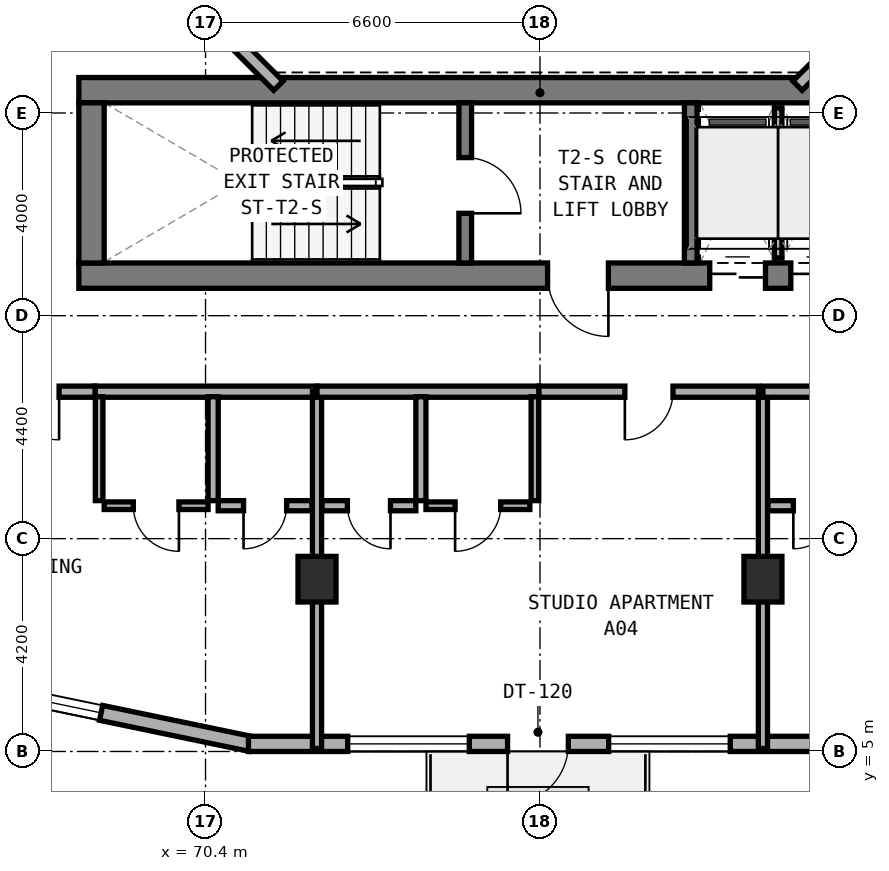
"""IFC4 building model, lengths in metres.
Left out: names, types, materials, properties, quantities, classifications, styles, units other than length and angle.
Written with IfcOpenShell. Run it as: python <this file> out.ifc"""

import sys

from ifc_helpers import new_model, si_unit, direction, frame, frame_2d, origin, origin_2d, place, context, subcontext, project, spatial, rectangle, extrude, element, fill, save


model = new_model("IFC4")
c1 = context("Model", 3, precision=1e-05, world=origin(), true_north=direction((0.0, 1.0)))
c2 = subcontext(c1, "Body", "Model", "MODEL_VIEW")
j1 = project(units=[si_unit("LENGTHUNIT", "METRE"), si_unit("PLANEANGLEUNIT", "RADIAN")], contexts=[c1])
p1 = place(None, origin())
s1 = spatial("IfcSite", under=j1, at=p1, CompositionType="ELEMENT")
p2 = place(p1, origin())
s2 = spatial("IfcBuilding", under=s1, at=p2, CompositionType="ELEMENT")
p3 = place(p2, frame((0.0, 0.0, 59.0)))
s3 = spatial("IfcBuildingStorey", under=s2, at=p3, CompositionType="ELEMENT", Elevation=59.0)
p4 = place(p3, frame((67.9, 14.39, 0.0), z_axis=(0.0, 0.0, 1.0), x_axis=(1.0, 0.0, 0.0)))
e1 = element("IfcWall", 1, at=p4, inside=s3, PredefinedType="SHEAR", context=c2, shape_type="SweptSolid", body=[
    extrude(rectangle(XDim=18.4, YDim=0.5, at=frame_2d((9.2, 0.0))), origin(), (0.0, 0.0, 1.0), 3.5),
])
p5 = place(p4, frame((9.25, 0.0, 0.0)))
e2 = element("IfcOpeningElement", 2, at=p5, cuts=e1, PredefinedType="OPENING", context=c2, shape_type="SweptSolid", body=[
    extrude(rectangle(XDim=1.2, YDim=2.15, at=frame_2d((0.6, 1.075))), frame((0.0, 0.26, 0.0), z_axis=(0.0, -1.0, 0.0), x_axis=(1.0, 0.0, 0.0)), (0.0, 0.0, 1.0), 0.52),
])
p6 = place(p4, frame((16.85, 0.0, 0.0)))
e3 = element("IfcOpeningElement", 3, at=p6, cuts=e1, PredefinedType="OPENING", context=c2, shape_type="SweptSolid", body=[
    extrude(rectangle(XDim=0.85, YDim=2.1, at=frame_2d((0.425, 1.05))), frame((0.0, 0.26, 0.0), z_axis=(0.0, -1.0, 0.0), x_axis=(1.0, 0.0, 0.0)), (0.0, 0.0, 1.0), 0.52),
])
p7 = place(p4, frame((12.45, 0.0, 0.0)))
e4 = element("IfcOpeningElement", 4, at=p7, cuts=e1, PredefinedType="OPENING", context=c2, shape_type="SweptSolid", body=[
    extrude(rectangle(XDim=1.1, YDim=2.15, at=frame_2d((0.55, 1.075))), frame((0.0, 0.26, 0.0), z_axis=(0.0, -1.0, 0.0), x_axis=(1.0, 0.0, 0.0)), (0.0, 0.0, 1.0), 0.52),
])
p8 = place(p4, frame((14.05, 0.0, 0.0)))
e5 = element("IfcOpeningElement", 5, at=p8, cuts=e1, PredefinedType="OPENING", context=c2, shape_type="SweptSolid", body=[
    extrude(rectangle(XDim=1.1, YDim=2.15, at=frame_2d((0.55, 1.075))), frame((0.0, 0.26, 0.0), z_axis=(0.0, -1.0, 0.0), x_axis=(1.0, 0.0, 0.0)), (0.0, 0.0, 1.0), 0.52),
])
p9 = place(p3, frame((67.9, 18.05, 0.0), z_axis=(0.0, 0.0, 1.0), x_axis=(1.0, 0.0, 0.0)))
e6 = element("IfcWall", 6, at=p9, inside=s3, PredefinedType="SHEAR", context=c2, shape_type="SweptSolid", body=[
    extrude(rectangle(XDim=18.4, YDim=0.5, at=frame_2d((9.2, 0.0))), origin(), (0.0, 0.0, 1.0), 3.5),
])
p10 = place(p3, frame((68.15, 14.64, 0.0), z_axis=(0.0, 0.0, 1.0), x_axis=(0.0, 1.0, 0.0)))
e7 = element("IfcWall", 7, at=p10, inside=s3, PredefinedType="SHEAR", context=c2, shape_type="SweptSolid", body=[
    extrude(rectangle(XDim=3.16, YDim=0.5, at=frame_2d((1.58, 0.0))), origin(), (0.0, 0.0, 1.0), 3.5),
])
p11 = place(p3, frame((75.525, 14.64, 0.0), z_axis=(0.0, 0.0, 1.0), x_axis=(0.0, 1.0, 0.0)))
e8 = element("IfcWall", 8, at=p11, inside=s3, PredefinedType="STANDARD", context=c2, shape_type="SweptSolid", body=[
    extrude(rectangle(XDim=3.16, YDim=0.25, at=frame_2d((1.58, 0.0))), origin(), (0.0, 0.0, 1.0), 3.25),
])
p12 = place(p11, frame((0.98, 0.0, 0.0)))
e9 = element("IfcOpeningElement", 9, at=p12, cuts=e8, PredefinedType="OPENING", context=c2, shape_type="SweptSolid", body=[
    extrude(rectangle(XDim=1.1, YDim=2.15, at=frame_2d((0.55, 1.075))), frame((0.0, 0.135, 0.0), z_axis=(0.0, -1.0, 0.0), x_axis=(1.0, 0.0, 0.0)), (0.0, 0.0, 1.0), 0.27),
])
p13 = place(p3, frame((79.975, 14.64, 0.0), z_axis=(0.0, 0.0, 1.0), x_axis=(0.0, 1.0, 0.0)))
e10 = element("IfcWall", 10, at=p13, inside=s3, PredefinedType="STANDARD", context=c2, shape_type="SweptSolid", body=[
    extrude(rectangle(XDim=3.16, YDim=0.25, at=frame_2d((1.58, 0.0))), origin(), (0.0, 0.0, 1.0), 3.25),
])
for number, where, z_axis, x_axis in (
    (11, (72.6, 8.4, 0.0), (0.0, 0.0, 1.0), (1.0, 0.0, 0.0)),
    (12, (81.4, 8.4, 0.0), (0.0, 0.0, 1.0), (1.0, 0.0, 0.0)),
):
    element("IfcColumn", number, at=place(p3, frame(where, z_axis=z_axis, x_axis=x_axis)), inside=s3, PredefinedType="COLUMN", context=c2, shape_type="SweptSolid", body=[
        extrude(rectangle(XDim=0.75, YDim=0.9, at=origin_2d()), origin(), (0.0, 0.0, 1.0), 3.5),
    ])
p14 = place(p3, frame((62.622, 6.949, 0.0), z_axis=(0.0, 0.0, 1.0), x_axis=(0.979119654102, -0.203284782882, 0.0)))
e13 = element("IfcWall", 13, at=p14, inside=s3, PredefinedType="STANDARD", context=c2, shape_type="SweptSolid", body=[
    extrude(rectangle(XDim=8.855, YDim=0.3, at=frame_2d((4.427, 0.0))), origin(), (0.0, 0.0, 1.0), 3.25),
])
p15 = place(p14, frame((3.439, 0.0, 0.8)))
e14 = element("IfcOpeningElement", 14, at=p15, cuts=e13, PredefinedType="OPENING", context=c2, shape_type="SweptSolid", body=[
    extrude(rectangle(XDim=2.4, YDim=1.6, at=frame_2d((1.2, 0.8))), frame((0.0, 0.16, 0.0), z_axis=(0.0, -1.0, 0.0), x_axis=(1.0, 0.0, 0.0)), (0.0, 0.0, 1.0), 0.32),
])
p16 = place(p3, frame((71.247, 5.15, 0.0), z_axis=(0.0, 0.0, 1.0), x_axis=(1.0, 0.0, 0.0)))
e15 = element("IfcWall", 15, at=p16, inside=s3, PredefinedType="STANDARD", context=c2, shape_type="SweptSolid", body=[
    extrude(rectangle(XDim=11.391, YDim=0.3, at=frame_2d((5.695, 0.0))), origin(), (0.0, 0.0, 1.0), 3.25),
])
p17 = place(p16, frame((5.113, 0.0, 0.0)))
e16 = element("IfcOpeningElement", 16, at=p17, cuts=e15, PredefinedType="OPENING", context=c2, shape_type="SweptSolid", body=[
    extrude(rectangle(XDim=1.2, YDim=2.15, at=frame_2d((0.6, 1.075))), frame((0.0, 0.16, 0.0), z_axis=(0.0, -1.0, 0.0), x_axis=(1.0, 0.0, 0.0)), (0.0, 0.0, 1.0), 0.32),
])
p18 = place(p16, frame((1.958, 0.0, 0.8)))
e17 = element("IfcOpeningElement", 17, at=p18, cuts=e15, PredefinedType="OPENING", context=c2, shape_type="SweptSolid", body=[
    extrude(rectangle(XDim=2.4, YDim=1.6, at=frame_2d((1.2, 0.8))), frame((0.0, 0.16, 0.0), z_axis=(0.0, -1.0, 0.0), x_axis=(1.0, 0.0, 0.0)), (0.0, 0.0, 1.0), 0.32),
])
p19 = place(p16, frame((7.108, 0.0, 0.8)))
e18 = element("IfcOpeningElement", 18, at=p19, cuts=e15, PredefinedType="OPENING", context=c2, shape_type="SweptSolid", body=[
    extrude(rectangle(XDim=2.4, YDim=1.6, at=frame_2d((1.2, 0.8))), frame((0.0, 0.16, 0.0), z_axis=(0.0, -1.0, 0.0), x_axis=(1.0, 0.0, 0.0)), (0.0, 0.0, 1.0), 0.32),
])
for number, where, z_axis, x_axis in (
    (19, (82.082, 18.138, 0.0), (0.0, 0.0, 1.0), (0.707, 0.707, 0.0)),
    (20, (70.204, 19.772, 0.0), (0.0, 0.0, 1.0), (0.707, -0.707, 0.0)),
):
    element("IfcWall", number, at=place(p3, frame(where, z_axis=z_axis, x_axis=x_axis)), inside=s3, PredefinedType="STANDARD", context=c2, shape_type="SweptSolid", body=[
        extrude(rectangle(XDim=2.311, YDim=0.26, at=frame_2d((1.155, 0.0))), origin(), (0.0, 0.0, 1.0), 3.25),
    ])
p20 = place(p3, frame((81.7, 14.74, 0.0), z_axis=(0.0, 0.0, 1.0), x_axis=(0.0, 1.0, 0.0)))
e21 = element("IfcWall", 21, at=p20, inside=s3, PredefinedType="PARTITIONING", context=c2, shape_type="SweptSolid", body=[
    extrude(rectangle(XDim=2.96, YDim=0.15, at=frame_2d((1.48, 0.0))), origin(), (0.0, 0.0, 1.0), 3.22),
])
p21 = place(p3, frame((68.22, 12.1, 0.0), z_axis=(0.0, 0.0, 1.0), x_axis=(1.0, 0.0, 0.0)))
e22 = element("IfcWall", 22, at=p21, inside=s3, PredefinedType="SOLIDWALL", context=c2, shape_type="SweptSolid", body=[
    extrude(rectangle(XDim=4.38, YDim=0.22, at=frame_2d((2.19, 0.0))), origin(), (0.0, 0.0, 1.0), 2.725),
])
p22 = place(p3, frame((65.85, 12.1, 0.0), z_axis=(0.0, 0.0, 1.0), x_axis=(1.0, 0.0, 0.0)))
e23 = element("IfcWall", 23, at=p22, inside=s3, PredefinedType="SOLIDWALL", context=c2, shape_type="SweptSolid", body=[
    extrude(rectangle(XDim=2.37, YDim=0.22, at=frame_2d((1.185, 0.0))), origin(), (0.0, 0.0, 1.0), 3.22),
])
p23 = place(p22, frame((0.71, 0.0, 0.0)))
e24 = element("IfcOpeningElement", 24, at=p23, cuts=e23, PredefinedType="OPENING", context=c2, shape_type="SweptSolid", body=[
    extrude(rectangle(XDim=0.95, YDim=2.1, at=frame_2d((0.475, 1.05))), frame((0.0, 0.12, 0.0), z_axis=(0.0, -1.0, 0.0), x_axis=(1.0, 0.0, 0.0)), (0.0, 0.0, 1.0), 0.24),
])
p24 = place(p3, frame((70.55, 9.95, 0.0), z_axis=(0.0, 0.0, 1.0), x_axis=(0.0, 1.0, 0.0)))
e25 = element("IfcWall", 25, at=p24, inside=s3, PredefinedType="PLUMBINGWALL", context=c2, shape_type="SweptSolid", body=[
    extrude(rectangle(XDim=2.05, YDim=0.2, at=frame_2d((1.025, 0.0))), origin(), (0.0, 0.0, 1.0), 3.22),
])
p25 = place(p3, frame((68.3, 9.95, 0.0), z_axis=(0.0, 0.0, 1.0), x_axis=(0.0, 1.0, 0.0)))
e26 = element("IfcWall", 26, at=p25, inside=s3, PredefinedType="PARTITIONING", context=c2, shape_type="SweptSolid", body=[
    extrude(rectangle(XDim=2.05, YDim=0.15, at=frame_2d((1.025, 0.0))), origin(), (0.0, 0.0, 1.0), 3.22),
])
p26 = place(p3, frame((70.65, 9.85, 0.0), z_axis=(0.0, 0.0, 1.0), x_axis=(1.0, 0.0, 0.0)))
e27 = element("IfcWall", 27, at=p26, inside=s3, PredefinedType="PLUMBINGWALL", context=c2, shape_type="SweptSolid", body=[
    extrude(rectangle(XDim=1.85, YDim=0.2, at=frame_2d((0.925, 0.0))), origin(), (0.0, 0.0, 1.0), 3.22),
])
p27 = place(p26, frame((0.5, 0.0, 0.0)))
e28 = element("IfcOpeningElement", 28, at=p27, cuts=e27, PredefinedType="OPENING", context=c2, shape_type="SweptSolid", body=[
    extrude(rectangle(XDim=0.85, YDim=2.1, at=frame_2d((0.425, 1.05))), frame((0.0, 0.11, 0.0), z_axis=(0.0, -1.0, 0.0), x_axis=(1.0, 0.0, 0.0)), (0.0, 0.0, 1.0), 0.22),
])
p28 = place(p3, frame((68.4, 9.85, 0.0), z_axis=(0.0, 0.0, 1.0), x_axis=(1.0, 0.0, 0.0)))
e29 = element("IfcWall", 29, at=p28, inside=s3, PredefinedType="PARTITIONING", context=c2, shape_type="SweptSolid", body=[
    extrude(rectangle(XDim=2.05, YDim=0.15, at=frame_2d((1.025, 0.0))), origin(), (0.0, 0.0, 1.0), 3.22),
])
p29 = place(p28, frame((0.575, 0.0, 0.0)))
e30 = element("IfcOpeningElement", 30, at=p29, cuts=e29, PredefinedType="OPENING", context=c2, shape_type="SweptSolid", body=[
    extrude(rectangle(XDim=0.9, YDim=2.1, at=frame_2d((0.45, 1.05))), frame((0.0, 0.085, 0.0), z_axis=(0.0, -1.0, 0.0), x_axis=(1.0, 0.0, 0.0)), (0.0, 0.0, 1.0), 0.17),
])
p30 = place(p3, frame((72.6, 5.06, 0.0), z_axis=(0.0, 0.0, 1.0), x_axis=(0.0, 1.0, 0.0)))
e31 = element("IfcWall", 31, at=p30, inside=s3, PredefinedType="SOLIDWALL", context=c2, shape_type="SweptSolid", body=[
    extrude(rectangle(XDim=7.04, YDim=0.18, at=frame_2d((3.52, 0.0))), origin(), (0.0, 0.0, 1.0), 2.725),
])
p31 = place(p3, frame((72.6, 12.1, 0.0), z_axis=(0.0, 0.0, 1.0), x_axis=(1.0, 0.0, 0.0)))
e32 = element("IfcWall", 32, at=p31, inside=s3, PredefinedType="SOLIDWALL", context=c2, shape_type="SweptSolid", body=[
    extrude(rectangle(XDim=4.38, YDim=0.22, at=frame_2d((2.19, 0.0))), origin(), (0.0, 0.0, 1.0), 2.725),
])
p32 = place(p3, frame((76.98, 12.1, 0.0), z_axis=(0.0, 0.0, 1.0), x_axis=(1.0, 0.0, 0.0)))
e33 = element("IfcWall", 33, at=p32, inside=s3, PredefinedType="SOLIDWALL", context=c2, shape_type="SweptSolid", body=[
    extrude(rectangle(XDim=4.34, YDim=0.22, at=frame_2d((2.17, 0.0))), origin(), (0.0, 0.0, 1.0), 2.725),
])
p33 = place(p32, frame((1.695, 0.0, 0.0)))
e34 = element("IfcOpeningElement", 34, at=p33, cuts=e33, PredefinedType="OPENING", context=c2, shape_type="SweptSolid", body=[
    extrude(rectangle(XDim=0.95, YDim=2.1, at=frame_2d((0.475, 1.05))), frame((0.0, 0.12, 0.0), z_axis=(0.0, -1.0, 0.0), x_axis=(1.0, 0.0, 0.0)), (0.0, 0.0, 1.0), 0.24),
])
p34 = place(p3, frame((74.65, 9.95, 0.0), z_axis=(0.0, 0.0, 1.0), x_axis=(0.0, 1.0, 0.0)))
e35 = element("IfcWall", 35, at=p34, inside=s3, PredefinedType="PLUMBINGWALL", context=c2, shape_type="SweptSolid", body=[
    extrude(rectangle(XDim=2.05, YDim=0.2, at=frame_2d((1.025, 0.0))), origin(), (0.0, 0.0, 1.0), 2.865),
])
p35 = place(p3, frame((76.9, 9.95, 0.0), z_axis=(0.0, 0.0, 1.0), x_axis=(0.0, 1.0, 0.0)))
e36 = element("IfcWall", 36, at=p35, inside=s3, PredefinedType="PARTITIONING", context=c2, shape_type="SweptSolid", body=[
    extrude(rectangle(XDim=2.05, YDim=0.15, at=frame_2d((1.025, 0.0))), origin(), (0.0, 0.0, 1.0), 2.865),
])
p36 = place(p3, frame((72.7, 9.85, 0.0), z_axis=(0.0, 0.0, 1.0), x_axis=(1.0, 0.0, 0.0)))
e37 = element("IfcWall", 37, at=p36, inside=s3, PredefinedType="PLUMBINGWALL", context=c2, shape_type="SweptSolid", body=[
    extrude(rectangle(XDim=1.85, YDim=0.2, at=frame_2d((0.925, 0.0))), origin(), (0.0, 0.0, 1.0), 3.22),
])
p37 = place(p36, frame((0.5, 0.0, 0.0)))
e38 = element("IfcOpeningElement", 38, at=p37, cuts=e37, PredefinedType="OPENING", context=c2, shape_type="SweptSolid", body=[
    extrude(rectangle(XDim=0.85, YDim=2.1, at=frame_2d((0.425, 1.05))), frame((0.0, 0.11, 0.0), z_axis=(0.0, -1.0, 0.0), x_axis=(1.0, 0.0, 0.0)), (0.0, 0.0, 1.0), 0.22),
])
p38 = place(p3, frame((74.75, 9.85, 0.0), z_axis=(0.0, 0.0, 1.0), x_axis=(1.0, 0.0, 0.0)))
e39 = element("IfcWall", 39, at=p38, inside=s3, PredefinedType="PARTITIONING", context=c2, shape_type="SweptSolid", body=[
    extrude(rectangle(XDim=2.05, YDim=0.15, at=frame_2d((1.025, 0.0))), origin(), (0.0, 0.0, 1.0), 3.22),
])
p39 = place(p38, frame((0.575, 0.0, 0.0)))
e40 = element("IfcOpeningElement", 40, at=p39, cuts=e39, PredefinedType="OPENING", context=c2, shape_type="SweptSolid", body=[
    extrude(rectangle(XDim=0.9, YDim=2.1, at=frame_2d((0.45, 1.05))), frame((0.0, 0.085, 0.0), z_axis=(0.0, -1.0, 0.0), x_axis=(1.0, 0.0, 0.0)), (0.0, 0.0, 1.0), 0.17),
])
p40 = place(p3, frame((81.4, 5.06, 0.0), z_axis=(0.0, 0.0, 1.0), x_axis=(0.0, 1.0, 0.0)))
e41 = element("IfcWall", 41, at=p40, inside=s3, PredefinedType="SOLIDWALL", context=c2, shape_type="SweptSolid", body=[
    extrude(rectangle(XDim=7.04, YDim=0.18, at=frame_2d((3.52, 0.0))), origin(), (0.0, 0.0, 1.0), 2.725),
])
p41 = place(p3, frame((81.4, 12.1, 0.0), z_axis=(0.0, 0.0, 1.0), x_axis=(1.0, 0.0, 0.0)))
e42 = element("IfcWall", 42, at=p41, inside=s3, PredefinedType="SOLIDWALL", context=c2, shape_type="SweptSolid", body=[
    extrude(rectangle(XDim=4.38, YDim=0.22, at=frame_2d((2.19, 0.0))), origin(), (0.0, 0.0, 1.0), 2.725),
])
p42 = place(p3, frame((81.5, 9.85, 0.0), z_axis=(0.0, 0.0, 1.0), x_axis=(1.0, 0.0, 0.0)))
e43 = element("IfcWall", 43, at=p42, inside=s3, PredefinedType="PLUMBINGWALL", context=c2, shape_type="SweptSolid", body=[
    extrude(rectangle(XDim=1.85, YDim=0.2, at=frame_2d((0.925, 0.0))), origin(), (0.0, 0.0, 1.0), 2.725),
])
p43 = place(p42, frame((0.5, 0.0, 0.0)))
e44 = element("IfcOpeningElement", 44, at=p43, cuts=e43, PredefinedType="OPENING", context=c2, shape_type="SweptSolid", body=[
    extrude(rectangle(XDim=0.85, YDim=2.1, at=frame_2d((0.425, 1.05))), frame((0.0, 0.11, 0.0), z_axis=(0.0, -1.0, 0.0), x_axis=(1.0, 0.0, 0.0)), (0.0, 0.0, 1.0), 0.22),
])
p44 = place(p15, origin())
e45 = element("IfcWindow", 45, at=p44, inside=s3, PartitioningType="SINGLE_PANEL", PredefinedType="WINDOW", context=c2, shape_type="SweptSolid", body=[
    extrude(rectangle(XDim=2.4, YDim=1.6, at=frame_2d((1.2, 0.8))), frame((0.0, 0.03, 0.0), z_axis=(0.0, -1.0, 0.0), x_axis=(1.0, 0.0, 0.0)), (0.0, 0.0, 1.0), 0.06),
])
fill(e14, e45)
p45 = place(p17, frame((1.2, 0.0, 0.0), z_axis=(0.0, 0.0, 1.0), x_axis=(-1.0, 0.0, 0.0)))
e46 = element("IfcDoor", 46, at=p45, inside=s3, OperationType="SINGLE_SWING_RIGHT", PredefinedType="DOOR", context=c2, shape_type="SweptSolid", body=[
    extrude(rectangle(XDim=1.2, YDim=2.15, at=frame_2d((0.6, 1.075))), frame((0.0, 0.025, 0.0), z_axis=(0.0, -1.0, 0.0), x_axis=(1.0, 0.0, 0.0)), (0.0, 0.0, 1.0), 0.05),
])
fill(e16, e46)
p46 = place(p18, origin())
e47 = element("IfcWindow", 47, at=p46, inside=s3, PartitioningType="SINGLE_PANEL", PredefinedType="WINDOW", context=c2, shape_type="SweptSolid", body=[
    extrude(rectangle(XDim=2.4, YDim=1.6, at=frame_2d((1.2, 0.8))), frame((0.0, 0.03, 0.0), z_axis=(0.0, -1.0, 0.0), x_axis=(1.0, 0.0, 0.0)), (0.0, 0.0, 1.0), 0.06),
])
fill(e17, e47)
p47 = place(p19, origin())
e48 = element("IfcWindow", 48, at=p47, inside=s3, PartitioningType="SINGLE_PANEL", PredefinedType="WINDOW", context=c2, shape_type="SweptSolid", body=[
    extrude(rectangle(XDim=2.4, YDim=1.6, at=frame_2d((1.2, 0.8))), frame((0.0, 0.03, 0.0), z_axis=(0.0, -1.0, 0.0), x_axis=(1.0, 0.0, 0.0)), (0.0, 0.0, 1.0), 0.06),
])
fill(e18, e48)
p48 = place(p12, frame((1.1, 0.0, 0.0), z_axis=(0.0, 0.0, 1.0), x_axis=(-1.0, 0.0, 0.0)))
e49 = element("IfcDoor", 49, at=p48, inside=s3, OperationType="SINGLE_SWING_RIGHT", PredefinedType="DOOR", context=c2, shape_type="SweptSolid", body=[
    extrude(rectangle(XDim=1.1, YDim=2.15, at=frame_2d((0.55, 1.075))), frame((0.0, 0.025, 0.0), z_axis=(0.0, -1.0, 0.0), x_axis=(1.0, 0.0, 0.0)), (0.0, 0.0, 1.0), 0.05),
])
fill(e9, e49)
p49 = place(p5, frame((1.2, 0.0, 0.0), z_axis=(0.0, 0.0, 1.0), x_axis=(-1.0, 0.0, 0.0)))
e50 = element("IfcDoor", 50, at=p49, inside=s3, OperationType="SINGLE_SWING_LEFT", PredefinedType="DOOR", context=c2, shape_type="SweptSolid", body=[
    extrude(rectangle(XDim=1.2, YDim=2.15, at=frame_2d((0.6, 1.075))), frame((0.0, 0.025, 0.0), z_axis=(0.0, -1.0, 0.0), x_axis=(1.0, 0.0, 0.0)), (0.0, 0.0, 1.0), 0.05),
])
fill(e2, e50)
p50 = place(p7, frame((1.1, 0.0, 0.0), z_axis=(0.0, 0.0, 1.0), x_axis=(-1.0, 0.0, 0.0)))
e51 = element("IfcDoor", 51, at=p50, inside=s3, OperationType="DOUBLE_DOOR_SLIDING", PredefinedType="DOOR", context=c2, shape_type="SweptSolid", body=[
    extrude(rectangle(XDim=1.1, YDim=2.15, at=frame_2d((0.55, 1.075))), frame((0.0, 0.025, 0.0), z_axis=(0.0, -1.0, 0.0), x_axis=(1.0, 0.0, 0.0)), (0.0, 0.0, 1.0), 0.05),
])
fill(e4, e51)
p51 = place(p8, frame((1.1, 0.0, 0.0), z_axis=(0.0, 0.0, 1.0), x_axis=(-1.0, 0.0, 0.0)))
e52 = element("IfcDoor", 52, at=p51, inside=s3, OperationType="DOUBLE_DOOR_SLIDING", PredefinedType="DOOR", context=c2, shape_type="SweptSolid", body=[
    extrude(rectangle(XDim=1.1, YDim=2.15, at=frame_2d((0.55, 1.075))), frame((0.0, 0.025, 0.0), z_axis=(0.0, -1.0, 0.0), x_axis=(1.0, 0.0, 0.0)), (0.0, 0.0, 1.0), 0.05),
])
fill(e5, e52)
p52 = place(p23, frame((0.95, 0.0, 0.0), z_axis=(0.0, 0.0, 1.0), x_axis=(-1.0, 0.0, 0.0)))
e53 = element("IfcDoor", 53, at=p52, inside=s3, OperationType="SINGLE_SWING_LEFT", PredefinedType="DOOR", context=c2, shape_type="SweptSolid", body=[
    extrude(rectangle(XDim=0.95, YDim=2.1, at=frame_2d((0.475, 1.05))), frame((0.0, 0.025, 0.0), z_axis=(0.0, -1.0, 0.0), x_axis=(1.0, 0.0, 0.0)), (0.0, 0.0, 1.0), 0.05),
])
fill(e24, e53)
p53 = place(p27, frame((0.85, 0.0, 0.0), z_axis=(0.0, 0.0, 1.0), x_axis=(-1.0, 0.0, 0.0)))
e54 = element("IfcDoor", 54, at=p53, inside=s3, OperationType="SINGLE_SWING_RIGHT", PredefinedType="DOOR", context=c2, shape_type="SweptSolid", body=[
    extrude(rectangle(XDim=0.85, YDim=2.1, at=frame_2d((0.425, 1.05))), frame((0.0, 0.025, 0.0), z_axis=(0.0, -1.0, 0.0), x_axis=(1.0, 0.0, 0.0)), (0.0, 0.0, 1.0), 0.05),
])
fill(e28, e54)
p54 = place(p29, frame((0.9, 0.0, 0.0), z_axis=(0.0, 0.0, 1.0), x_axis=(-1.0, 0.0, 0.0)))
e55 = element("IfcDoor", 55, at=p54, inside=s3, OperationType="SINGLE_SWING_LEFT", PredefinedType="DOOR", context=c2, shape_type="SweptSolid", body=[
    extrude(rectangle(XDim=0.9, YDim=2.1, at=frame_2d((0.45, 1.05))), frame((0.0, 0.025, 0.0), z_axis=(0.0, -1.0, 0.0), x_axis=(1.0, 0.0, 0.0)), (0.0, 0.0, 1.0), 0.05),
])
fill(e30, e55)
p55 = place(p33, frame((0.95, 0.0, 0.0), z_axis=(0.0, 0.0, 1.0), x_axis=(-1.0, 0.0, 0.0)))
e56 = element("IfcDoor", 56, at=p55, inside=s3, OperationType="SINGLE_SWING_RIGHT", PredefinedType="DOOR", context=c2, shape_type="SweptSolid", body=[
    extrude(rectangle(XDim=0.95, YDim=2.1, at=frame_2d((0.475, 1.05))), frame((0.0, 0.025, 0.0), z_axis=(0.0, -1.0, 0.0), x_axis=(1.0, 0.0, 0.0)), (0.0, 0.0, 1.0), 0.05),
])
fill(e34, e56)
p56 = place(p37, frame((0.85, 0.0, 0.0), z_axis=(0.0, 0.0, 1.0), x_axis=(-1.0, 0.0, 0.0)))
e57 = element("IfcDoor", 57, at=p56, inside=s3, OperationType="SINGLE_SWING_LEFT", PredefinedType="DOOR", context=c2, shape_type="SweptSolid", body=[
    extrude(rectangle(XDim=0.85, YDim=2.1, at=frame_2d((0.425, 1.05))), frame((0.0, 0.025, 0.0), z_axis=(0.0, -1.0, 0.0), x_axis=(1.0, 0.0, 0.0)), (0.0, 0.0, 1.0), 0.05),
])
fill(e38, e57)
p57 = place(p39, frame((0.9, 0.0, 0.0), z_axis=(0.0, 0.0, 1.0), x_axis=(-1.0, 0.0, 0.0)))
e58 = element("IfcDoor", 58, at=p57, inside=s3, OperationType="SINGLE_SWING_RIGHT", PredefinedType="DOOR", context=c2, shape_type="SweptSolid", body=[
    extrude(rectangle(XDim=0.9, YDim=2.1, at=frame_2d((0.45, 1.05))), frame((0.0, 0.025, 0.0), z_axis=(0.0, -1.0, 0.0), x_axis=(1.0, 0.0, 0.0)), (0.0, 0.0, 1.0), 0.05),
])
fill(e40, e58)
p58 = place(p43, frame((0.85, 0.0, 0.0), z_axis=(0.0, 0.0, 1.0), x_axis=(-1.0, 0.0, 0.0)))
e59 = element("IfcDoor", 59, at=p58, inside=s3, OperationType="SINGLE_SWING_RIGHT", PredefinedType="DOOR", context=c2, shape_type="SweptSolid", body=[
    extrude(rectangle(XDim=0.85, YDim=2.1, at=frame_2d((0.425, 1.05))), frame((0.0, 0.025, 0.0), z_axis=(0.0, -1.0, 0.0), x_axis=(1.0, 0.0, 0.0)), (0.0, 0.0, 1.0), 0.05),
])
fill(e44, e59)
save(model, sys.argv[1])
